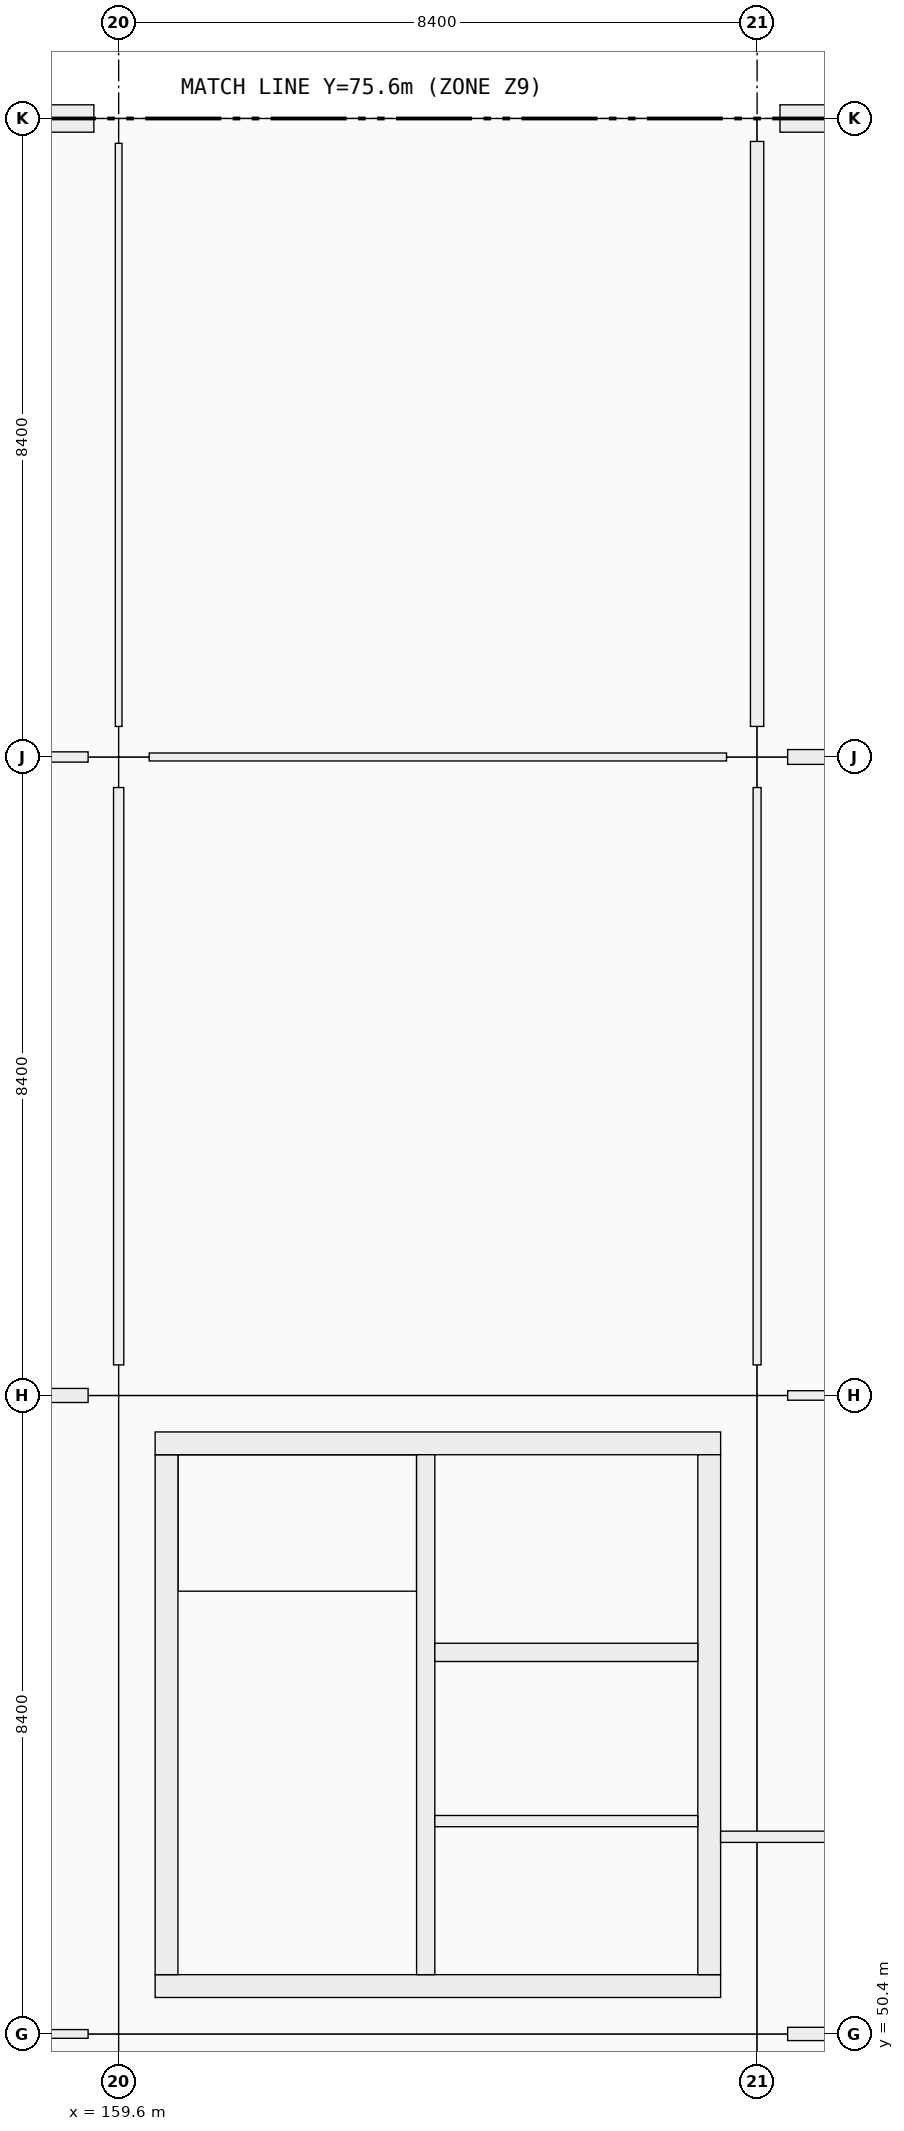
"""IFC4 building model, lengths in metres.
Left out: names, types, materials, properties, quantities, classifications, styles, units other than length and angle.
Written with IfcOpenShell. Run it as: python <this file> out.ifc"""

import sys

from ifc_helpers import new_model, si_unit, direction, frame, frame_2d, origin, origin_2d, place, context, subcontext, project, spatial, rectangle, extrude, element, fill, save


model = new_model("IFC4")
c1 = context("Model", 3, precision=1e-05, world=origin(), true_north=direction((0.0, 1.0)))
c2 = subcontext(c1, "Body", "Model", "MODEL_VIEW")
j1 = project(units=[si_unit("LENGTHUNIT", "METRE"), si_unit("PLANEANGLEUNIT", "RADIAN")], contexts=[c1])
p1 = place(None, origin())
s1 = spatial("IfcSite", under=j1, at=p1, CompositionType="ELEMENT")
p2 = place(p1, origin())
s2 = spatial("IfcBuilding", under=s1, at=p2, CompositionType="ELEMENT")
p3 = place(p2, origin())
s3 = spatial("IfcBuildingStorey", under=s2, at=p3, CompositionType="ELEMENT", Elevation=0.0)
for number, where, z_axis, x_axis in (
    (1, (159.6, 50.4, 0.0), (0.0, 0.0, 1.0), (1.0, 0.0, 0.0)),
    (2, (159.6, 58.8, 0.0), (0.0, 0.0, 1.0), (1.0, 0.0, 0.0)),
    (3, (159.6, 67.2, 0.0), (0.0, 0.0, 1.0), (1.0, 0.0, 0.0)),
):
    element("IfcColumn", number, at=place(p3, frame(where, z_axis=z_axis, x_axis=x_axis)), inside=s3, PredefinedType="COLUMN", context=c2, shape_type="SweptSolid", body=[
        extrude(rectangle(XDim=0.8, YDim=0.8, at=origin_2d()), origin(), (0.0, 0.0, 1.0), 5.76),
    ])
p4 = place(p3, frame((159.6, 75.6, 0.0), z_axis=(0.0, 0.0, 1.0), x_axis=(1.0, 0.0, 0.0)))
e4 = element("IfcColumn", 4, at=p4, inside=s3, PredefinedType="COLUMN", context=c2, shape_type="SweptSolid", body=[
    extrude(rectangle(XDim=0.65, YDim=0.65, at=origin_2d()), origin(), (0.0, 0.0, 1.0), 5.76),
])
for number, where, z_axis, x_axis in (
    (5, (168.0, 50.4, 0.0), (0.0, 0.0, 1.0), (1.0, 0.0, 0.0)),
    (6, (168.0, 58.8, 0.0), (0.0, 0.0, 1.0), (1.0, 0.0, 0.0)),
    (7, (168.0, 67.2, 0.0), (0.0, 0.0, 1.0), (1.0, 0.0, 0.0)),
):
    element("IfcColumn", number, at=place(p3, frame(where, z_axis=z_axis, x_axis=x_axis)), inside=s3, PredefinedType="COLUMN", context=c2, shape_type="SweptSolid", body=[
        extrude(rectangle(XDim=0.8, YDim=0.8, at=origin_2d()), origin(), (0.0, 0.0, 1.0), 5.76),
    ])
p5 = place(p3, frame((168.0, 75.6, 0.0), z_axis=(0.0, 0.0, 1.0), x_axis=(1.0, 0.0, 0.0)))
e8 = element("IfcColumn", 8, at=p5, inside=s3, PredefinedType="COLUMN", context=c2, shape_type="SweptSolid", body=[
    extrude(rectangle(XDim=0.6, YDim=0.6, at=origin_2d()), origin(), (0.0, 0.0, 1.0), 5.76),
])
p6 = place(p3, frame((151.501, 75.6, 0.0), z_axis=(0.0, 0.0, 1.0), x_axis=(1.0, 0.0, 0.0)))
e9 = element("IfcWall", 9, at=p6, inside=s3, PredefinedType="SOLIDWALL", context=c2, shape_type="SweptSolid", body=[
    extrude(rectangle(XDim=7.773, YDim=0.36, at=frame_2d((3.886, 0.0))), origin(), (0.0, 0.0, 1.0), 4.7),
])
p7 = place(p6, frame((2.686, 0.0, 0.9)))
e10 = element("IfcOpeningElement", 10, at=p7, cuts=e9, PredefinedType="OPENING", context=c2, shape_type="SweptSolid", body=[
    extrude(rectangle(XDim=2.4, YDim=1.8, at=frame_2d((1.2, 0.9))), frame((0.0, 0.18, 0.0), z_axis=(0.0, -1.0, 0.0), x_axis=(1.0, 0.0, 0.0)), (0.0, 0.0, 1.0), 0.36),
])
p8 = place(p3, frame((168.301, 75.6, 0.0), z_axis=(0.0, 0.0, 1.0), x_axis=(1.0, 0.0, 0.0)))
e11 = element("IfcWall", 11, at=p8, inside=s3, PredefinedType="SOLIDWALL", context=c2, shape_type="SweptSolid", body=[
    extrude(rectangle(XDim=7.773, YDim=0.36, at=frame_2d((3.886, 0.0))), origin(), (0.0, 0.0, 1.0), 4.7),
])
p9 = place(p8, frame((2.386, 0.0, 0.9)))
e12 = element("IfcOpeningElement", 12, at=p9, cuts=e11, PredefinedType="OPENING", context=c2, shape_type="SweptSolid", body=[
    extrude(rectangle(XDim=3.0, YDim=1.2, at=frame_2d((1.5, 0.6))), frame((0.0, 0.18, 0.0), z_axis=(0.0, -1.0, 0.0), x_axis=(1.0, 0.0, 0.0)), (0.0, 0.0, 1.0), 0.36),
])
p10 = place(p3, frame((167.52, 51.03, 0.0), z_axis=(0.0, 0.0, 1.0), x_axis=(-1.0, 0.0, 0.0)))
e13 = element("IfcWall", 13, at=p10, inside=s3, PredefinedType="SHEAR", context=c2, shape_type="SweptSolid", body=[
    extrude(rectangle(XDim=7.44, YDim=0.3, at=frame_2d((3.72, 0.0))), origin(), (0.0, 0.0, 1.0), 5.76),
])
p11 = place(p10, frame((1.28, 0.0, 0.0)))
e14 = element("IfcOpeningElement", 14, at=p11, cuts=e13, PredefinedType="OPENING", context=c2, shape_type="SweptSolid", body=[
    extrude(rectangle(XDim=1.5, YDim=2.15, at=frame_2d((0.75, 1.075))), frame((0.0, 0.15, 0.0), z_axis=(0.0, -1.0, 0.0), x_axis=(1.0, 0.0, 0.0)), (0.0, 0.0, 1.0), 0.3),
])
p12 = place(p3, frame((160.23, 51.18, 0.0), z_axis=(0.0, 0.0, 1.0), x_axis=(0.0, 1.0, 0.0)))
e15 = element("IfcWall", 15, at=p12, inside=s3, PredefinedType="SHEAR", context=c2, shape_type="SweptSolid", body=[
    extrude(rectangle(XDim=6.84, YDim=0.3, at=frame_2d((3.42, 0.0))), origin(), (0.0, 0.0, 1.0), 5.76),
])
p13 = place(p3, frame((160.08, 58.17, 0.0), z_axis=(0.0, 0.0, 1.0), x_axis=(1.0, 0.0, 0.0)))
e16 = element("IfcWall", 16, at=p13, inside=s3, PredefinedType="SHEAR", context=c2, shape_type="SweptSolid", body=[
    extrude(rectangle(XDim=7.44, YDim=0.3, at=frame_2d((3.72, 0.0))), origin(), (0.0, 0.0, 1.0), 5.76),
])
p14 = place(p3, frame((167.37, 58.02, 0.0), z_axis=(0.0, 0.0, 1.0), x_axis=(0.0, -1.0, 0.0)))
e17 = element("IfcWall", 17, at=p14, inside=s3, PredefinedType="SHEAR", context=c2, shape_type="SweptSolid", body=[
    extrude(rectangle(XDim=6.84, YDim=0.3, at=frame_2d((3.42, 0.0))), origin(), (0.0, 0.0, 1.0), 5.76),
])
p15 = place(p14, frame((5.12, 0.0, 0.0)))
e18 = element("IfcOpeningElement", 18, at=p15, cuts=e17, PredefinedType="OPENING", context=c2, shape_type="SweptSolid", body=[
    extrude(rectangle(XDim=1.5, YDim=2.15, at=frame_2d((0.75, 1.075))), frame((0.0, 0.15, 0.0), z_axis=(0.0, -1.0, 0.0), x_axis=(1.0, 0.0, 0.0)), (0.0, 0.0, 1.0), 0.3),
])
p16 = place(p3, frame((163.64, 51.18, 0.0), z_axis=(0.0, 0.0, 1.0), x_axis=(0.0, 1.0, 0.0)))
e19 = element("IfcWall", 19, at=p16, inside=s3, PredefinedType="SHEAR", context=c2, shape_type="SweptSolid", body=[
    extrude(rectangle(XDim=6.84, YDim=0.24, at=frame_2d((3.42, 0.0))), origin(), (0.0, 0.0, 1.0), 5.76),
])
p17 = place(p16, frame((0.12, 0.0, 0.0)))
e20 = element("IfcOpeningElement", 20, at=p17, cuts=e19, PredefinedType="OPENING", context=c2, shape_type="SweptSolid", body=[
    extrude(rectangle(XDim=1.0, YDim=2.15, at=frame_2d((0.5, 1.075))), frame((0.0, 0.12, 0.0), z_axis=(0.0, -1.0, 0.0), x_axis=(1.0, 0.0, 0.0)), (0.0, 0.0, 1.0), 0.24),
])
p18 = place(p3, frame((163.76, 55.42, 0.0), z_axis=(0.0, 0.0, 1.0), x_axis=(1.0, 0.0, 0.0)))
e21 = element("IfcWall", 21, at=p18, inside=s3, PredefinedType="SHEAR", context=c2, shape_type="SweptSolid", body=[
    extrude(rectangle(XDim=3.46, YDim=0.24, at=frame_2d((1.73, 0.0))), origin(), (0.0, 0.0, 1.0), 5.76),
])
p19 = place(p18, frame((1.08, 0.0, 0.0)))
e22 = element("IfcOpeningElement", 22, at=p19, cuts=e21, PredefinedType="OPENING", context=c2, shape_type="SweptSolid", body=[
    extrude(rectangle(XDim=1.3, YDim=2.25, at=frame_2d((0.65, 1.125))), frame((0.0, 0.12, 0.0), z_axis=(0.0, -1.0, 0.0), x_axis=(1.0, 0.0, 0.0)), (0.0, 0.0, 1.0), 0.24),
])
p20 = place(p3, frame((167.22, 53.2, 0.0), z_axis=(0.0, 0.0, 1.0), x_axis=(-1.0, 0.0, 0.0)))
e23 = element("IfcWall", 23, at=p20, inside=s3, PredefinedType="PARTITIONING", context=c2, shape_type="SweptSolid", body=[
    extrude(rectangle(XDim=3.46, YDim=0.148, at=frame_2d((1.73, 0.0))), origin(), (0.0, 0.0, 1.0), 5.51),
])
p21 = place(p20, frame((0.98, 0.0, 0.0)))
e24 = element("IfcOpeningElement", 24, at=p21, cuts=e23, PredefinedType="OPENING", context=c2, shape_type="SweptSolid", body=[
    extrude(rectangle(XDim=1.5, YDim=2.15, at=frame_2d((0.75, 1.075))), frame((0.0, 0.074, 0.0), z_axis=(0.0, -1.0, 0.0), x_axis=(1.0, 0.0, 0.0)), (0.0, 0.0, 1.0), 0.148),
])
p22 = place(p3, frame((151.602, 50.4, 0.0), z_axis=(0.0, 0.0, 1.0), x_axis=(1.0, 0.0, 0.0)))
e25 = element("IfcWall", 25, at=p22, inside=s3, PredefinedType="PARTITIONING", context=c2, shape_type="SweptSolid", body=[
    extrude(rectangle(XDim=7.596, YDim=0.115, at=frame_2d((3.798, 0.0))), origin(), (0.0, 0.0, 1.0), 3.66),
])
p23 = place(p22, frame((3.308, 0.0, 0.0)))
e26 = element("IfcOpeningElement", 26, at=p23, cuts=e25, PredefinedType="OPENING", context=c2, shape_type="SweptSolid", body=[
    extrude(rectangle(XDim=0.98, YDim=2.18, at=frame_2d((0.49, 1.09))), frame((0.0, 0.058, 0.0), z_axis=(0.0, -1.0, 0.0), x_axis=(1.0, 0.0, 0.0)), (0.0, 0.0, 1.0), 0.115),
])
p24 = place(p3, frame((151.602, 58.8, 0.0), z_axis=(0.0, 0.0, 1.0), x_axis=(1.0, 0.0, 0.0)))
e27 = element("IfcWall", 27, at=p24, inside=s3, PredefinedType="PARTITIONING", context=c2, shape_type="SweptSolid", body=[
    extrude(rectangle(XDim=7.596, YDim=0.185, at=frame_2d((3.798, 0.0))), origin(), (0.0, 0.0, 1.0), 3.66),
])
p25 = place(p24, frame((3.318, 0.0, 0.0)))
e28 = element("IfcOpeningElement", 28, at=p25, cuts=e27, PredefinedType="OPENING", context=c2, shape_type="SweptSolid", body=[
    extrude(rectangle(XDim=0.96, YDim=2.18, at=frame_2d((0.48, 1.09))), frame((0.0, 0.093, 0.0), z_axis=(0.0, -1.0, 0.0), x_axis=(1.0, 0.0, 0.0)), (0.0, 0.0, 1.0), 0.185),
])
p26 = place(p3, frame((151.602, 67.2, 0.0), z_axis=(0.0, 0.0, 1.0), x_axis=(1.0, 0.0, 0.0)))
e29 = element("IfcWall", 29, at=p26, inside=s3, PredefinedType="PARTITIONING", context=c2, shape_type="SweptSolid", body=[
    extrude(rectangle(XDim=7.596, YDim=0.135, at=frame_2d((3.798, 0.0))), origin(), (0.0, 0.0, 1.0), 3.66),
])
p27 = place(p26, frame((3.328, 0.0, 0.0)))
e30 = element("IfcOpeningElement", 30, at=p27, cuts=e29, PredefinedType="OPENING", context=c2, shape_type="SweptSolid", body=[
    extrude(rectangle(XDim=0.94, YDim=2.15, at=frame_2d((0.47, 1.075))), frame((0.0, 0.067, 0.0), z_axis=(0.0, -1.0, 0.0), x_axis=(1.0, 0.0, 0.0)), (0.0, 0.0, 1.0), 0.135),
])
p28 = place(p3, frame((160.002, 67.2, 0.0), z_axis=(0.0, 0.0, 1.0), x_axis=(1.0, 0.0, 0.0)))
e31 = element("IfcWall", 31, at=p28, inside=s3, PredefinedType="PARTITIONING", context=c2, shape_type="SweptSolid", body=[
    extrude(rectangle(XDim=7.596, YDim=0.105, at=frame_2d((3.798, 0.0))), origin(), (0.0, 0.0, 1.0), 3.66),
])
p29 = place(p28, frame((3.273, 0.0, 0.0)))
e32 = element("IfcOpeningElement", 32, at=p29, cuts=e31, PredefinedType="OPENING", context=c2, shape_type="SweptSolid", body=[
    extrude(rectangle(XDim=1.05, YDim=2.12, at=frame_2d((0.525, 1.06))), frame((0.0, 0.052, 0.0), z_axis=(0.0, -1.0, 0.0), x_axis=(1.0, 0.0, 0.0)), (0.0, 0.0, 1.0), 0.105),
])
p30 = place(p3, frame((168.402, 50.4, 0.0), z_axis=(0.0, 0.0, 1.0), x_axis=(1.0, 0.0, 0.0)))
e33 = element("IfcWall", 33, at=p30, inside=s3, PredefinedType="PARTITIONING", context=c2, shape_type="SweptSolid", body=[
    extrude(rectangle(XDim=7.696, YDim=0.175, at=frame_2d((3.848, 0.0))), origin(), (0.0, 0.0, 1.0), 3.66),
])
p31 = place(p30, frame((3.308, 0.0, 0.0)))
e34 = element("IfcOpeningElement", 34, at=p31, cuts=e33, PredefinedType="OPENING", context=c2, shape_type="SweptSolid", body=[
    extrude(rectangle(XDim=1.08, YDim=2.25, at=frame_2d((0.54, 1.125))), frame((0.0, 0.087, 0.0), z_axis=(0.0, -1.0, 0.0), x_axis=(1.0, 0.0, 0.0)), (0.0, 0.0, 1.0), 0.175),
])
p32 = place(p3, frame((168.402, 58.8, 0.0), z_axis=(0.0, 0.0, 1.0), x_axis=(1.0, 0.0, 0.0)))
e35 = element("IfcWall", 35, at=p32, inside=s3, PredefinedType="PARTITIONING", context=c2, shape_type="SweptSolid", body=[
    extrude(rectangle(XDim=7.671, YDim=0.125, at=frame_2d((3.835, 0.0))), origin(), (0.0, 0.0, 1.0), 3.66),
])
p33 = place(p32, frame((3.306, 0.0, 0.0)))
e36 = element("IfcOpeningElement", 36, at=p33, cuts=e35, PredefinedType="OPENING", context=c2, shape_type="SweptSolid", body=[
    extrude(rectangle(XDim=1.06, YDim=2.25, at=frame_2d((0.53, 1.125))), frame((0.0, 0.062, 0.0), z_axis=(0.0, -1.0, 0.0), x_axis=(1.0, 0.0, 0.0)), (0.0, 0.0, 1.0), 0.125),
])
p34 = place(p3, frame((168.402, 67.2, 0.0), z_axis=(0.0, 0.0, 1.0), x_axis=(1.0, 0.0, 0.0)))
e37 = element("IfcWall", 37, at=p34, inside=s3, PredefinedType="PARTITIONING", context=c2, shape_type="SweptSolid", body=[
    extrude(rectangle(XDim=7.696, YDim=0.195, at=frame_2d((3.848, 0.0))), origin(), (0.0, 0.0, 1.0), 3.66),
])
p35 = place(p34, frame((3.328, 0.0, 0.0)))
e38 = element("IfcOpeningElement", 38, at=p35, cuts=e37, PredefinedType="OPENING", context=c2, shape_type="SweptSolid", body=[
    extrude(rectangle(XDim=1.04, YDim=2.2, at=frame_2d((0.52, 1.1))), frame((0.0, 0.098, 0.0), z_axis=(0.0, -1.0, 0.0), x_axis=(1.0, 0.0, 0.0)), (0.0, 0.0, 1.0), 0.195),
])
p36 = place(p3, frame((159.6, 59.202, 0.0), z_axis=(0.0, 0.0, 1.0), x_axis=(0.0, 1.0, 0.0)))
e39 = element("IfcWall", 39, at=p36, inside=s3, PredefinedType="PARTITIONING", context=c2, shape_type="SweptSolid", body=[
    extrude(rectangle(XDim=7.596, YDim=0.135, at=frame_2d((3.798, 0.0))), origin(), (0.0, 0.0, 1.0), 3.66),
])
p37 = place(p36, frame((3.288, 0.0, 0.0)))
e40 = element("IfcOpeningElement", 40, at=p37, cuts=e39, PredefinedType="OPENING", context=c2, shape_type="SweptSolid", body=[
    extrude(rectangle(XDim=1.02, YDim=2.2, at=frame_2d((0.51, 1.1))), frame((0.0, 0.067, 0.0), z_axis=(0.0, -1.0, 0.0), x_axis=(1.0, 0.0, 0.0)), (0.0, 0.0, 1.0), 0.135),
])
p38 = place(p3, frame((159.6, 67.602, 0.0), z_axis=(0.0, 0.0, 1.0), x_axis=(0.0, 1.0, 0.0)))
e41 = element("IfcWall", 41, at=p38, inside=s3, PredefinedType="PARTITIONING", context=c2, shape_type="SweptSolid", body=[
    extrude(rectangle(XDim=7.671, YDim=0.088, at=frame_2d((3.835, 0.0))), origin(), (0.0, 0.0, 1.0), 3.66),
])
p39 = place(p38, frame((3.331, 0.0, 0.0)))
e42 = element("IfcOpeningElement", 42, at=p39, cuts=e41, PredefinedType="OPENING", context=c2, shape_type="SweptSolid", body=[
    extrude(rectangle(XDim=1.01, YDim=2.12, at=frame_2d((0.505, 1.06))), frame((0.0, 0.044, 0.0), z_axis=(0.0, -1.0, 0.0), x_axis=(1.0, 0.0, 0.0)), (0.0, 0.0, 1.0), 0.088),
])
p40 = place(p3, frame((168.0, 59.202, 0.0), z_axis=(0.0, 0.0, 1.0), x_axis=(0.0, 1.0, 0.0)))
e43 = element("IfcWall", 43, at=p40, inside=s3, PredefinedType="PARTITIONING", context=c2, shape_type="SweptSolid", body=[
    extrude(rectangle(XDim=7.596, YDim=0.105, at=frame_2d((3.798, 0.0))), origin(), (0.0, 0.0, 1.0), 3.66),
])
p41 = place(p40, frame((3.258, 0.0, 0.0)))
e44 = element("IfcOpeningElement", 44, at=p41, cuts=e43, PredefinedType="OPENING", context=c2, shape_type="SweptSolid", body=[
    extrude(rectangle(XDim=1.08, YDim=2.25, at=frame_2d((0.54, 1.125))), frame((0.0, 0.052, 0.0), z_axis=(0.0, -1.0, 0.0), x_axis=(1.0, 0.0, 0.0)), (0.0, 0.0, 1.0), 0.105),
])
p42 = place(p3, frame((168.0, 67.602, 0.0), z_axis=(0.0, 0.0, 1.0), x_axis=(0.0, 1.0, 0.0)))
e45 = element("IfcWall", 45, at=p42, inside=s3, PredefinedType="PARTITIONING", context=c2, shape_type="SweptSolid", body=[
    extrude(rectangle(XDim=7.696, YDim=0.175, at=frame_2d((3.848, 0.0))), origin(), (0.0, 0.0, 1.0), 3.66),
])
p43 = place(p42, frame((3.318, 0.0, 0.0)))
e46 = element("IfcOpeningElement", 46, at=p43, cuts=e45, PredefinedType="OPENING", context=c2, shape_type="SweptSolid", body=[
    extrude(rectangle(XDim=1.06, YDim=2.25, at=frame_2d((0.53, 1.125))), frame((0.0, 0.087, 0.0), z_axis=(0.0, -1.0, 0.0), x_axis=(1.0, 0.0, 0.0)), (0.0, 0.0, 1.0), 0.175),
])
p44 = place(p3, frame((167.52, 52.994, 0.0), z_axis=(0.0, 0.0, 1.0), x_axis=(1.0, 0.0, 0.0)))
e47 = element("IfcWall", 47, at=p44, inside=s3, PredefinedType="PARTITIONING", context=c2, shape_type="SweptSolid", body=[
    extrude(rectangle(XDim=8.7, YDim=0.148, at=frame_2d((4.35, 0.0))), origin(), (0.0, 0.0, 1.0), 3.66),
])
p45 = place(p17, origin())
e48 = element("IfcDoor", 48, at=p45, inside=s3, OperationType="SINGLE_SWING_LEFT", PredefinedType="DOOR", context=c2, shape_type="SweptSolid", body=[
    extrude(rectangle(XDim=1.0, YDim=2.15, at=frame_2d((0.5, 1.075))), frame((0.0, 0.025, 0.0), z_axis=(0.0, -1.0, 0.0), x_axis=(1.0, 0.0, 0.0)), (0.0, 0.0, 1.0), 0.05),
])
fill(e20, e48)
p46 = place(p11, origin())
e49 = element("IfcDoor", 49, at=p46, inside=s3, OperationType="DOUBLE_DOOR_SINGLE_SWING", PredefinedType="DOOR", context=c2, shape_type="SweptSolid", body=[
    extrude(rectangle(XDim=1.5, YDim=2.15, at=frame_2d((0.75, 1.075))), frame((0.0, 0.025, 0.0), z_axis=(0.0, -1.0, 0.0), x_axis=(1.0, 0.0, 0.0)), (0.0, 0.0, 1.0), 0.05),
])
fill(e14, e49)
p47 = place(p15, origin())
e50 = element("IfcDoor", 50, at=p47, inside=s3, OperationType="DOUBLE_DOOR_SINGLE_SWING", PredefinedType="DOOR", context=c2, shape_type="SweptSolid", body=[
    extrude(rectangle(XDim=1.5, YDim=2.15, at=frame_2d((0.75, 1.075))), frame((0.0, 0.025, 0.0), z_axis=(0.0, -1.0, 0.0), x_axis=(1.0, 0.0, 0.0)), (0.0, 0.0, 1.0), 0.05),
])
fill(e18, e50)
p48 = place(p19, origin())
e51 = element("IfcDoor", 51, at=p48, inside=s3, OperationType="DOUBLE_DOOR_SLIDING", PredefinedType="DOOR", context=c2, shape_type="SweptSolid", body=[
    extrude(rectangle(XDim=1.3, YDim=2.25, at=frame_2d((0.65, 1.125))), frame((0.0, 0.025, 0.0), z_axis=(0.0, -1.0, 0.0), x_axis=(1.0, 0.0, 0.0)), (0.0, 0.0, 1.0), 0.05),
])
fill(e22, e51)
p49 = place(p21, origin())
e52 = element("IfcDoor", 52, at=p49, inside=s3, OperationType="DOUBLE_DOOR_SINGLE_SWING", PredefinedType="DOOR", context=c2, shape_type="SweptSolid", body=[
    extrude(rectangle(XDim=1.5, YDim=2.15, at=frame_2d((0.75, 1.075))), frame((0.0, 0.025, 0.0), z_axis=(0.0, -1.0, 0.0), x_axis=(1.0, 0.0, 0.0)), (0.0, 0.0, 1.0), 0.05),
])
fill(e24, e52)
p50 = place(p29, origin())
e53 = element("IfcDoor", 53, at=p50, inside=s3, OperationType="SINGLE_SWING_RIGHT", PredefinedType="DOOR", context=c2, shape_type="SweptSolid", body=[
    extrude(rectangle(XDim=1.05, YDim=2.12, at=frame_2d((0.525, 1.06))), frame((0.0, 0.025, 0.0), z_axis=(0.0, -1.0, 0.0), x_axis=(1.0, 0.0, 0.0)), (0.0, 0.0, 1.0), 0.05),
])
fill(e32, e53)
p51 = place(p37, origin())
e54 = element("IfcDoor", 54, at=p51, inside=s3, OperationType="SINGLE_SWING_LEFT", PredefinedType="DOOR", context=c2, shape_type="SweptSolid", body=[
    extrude(rectangle(XDim=1.02, YDim=2.2, at=frame_2d((0.51, 1.1))), frame((0.0, 0.025, 0.0), z_axis=(0.0, -1.0, 0.0), x_axis=(1.0, 0.0, 0.0)), (0.0, 0.0, 1.0), 0.05),
])
fill(e40, e54)
p52 = place(p39, origin())
e55 = element("IfcDoor", 55, at=p52, inside=s3, OperationType="SINGLE_SWING_RIGHT", PredefinedType="DOOR", context=c2, shape_type="SweptSolid", body=[
    extrude(rectangle(XDim=1.01, YDim=2.12, at=frame_2d((0.505, 1.06))), frame((0.0, 0.025, 0.0), z_axis=(0.0, -1.0, 0.0), x_axis=(1.0, 0.0, 0.0)), (0.0, 0.0, 1.0), 0.05),
])
fill(e42, e55)
p53 = place(p41, origin())
e56 = element("IfcDoor", 56, at=p53, inside=s3, OperationType="SINGLE_SWING_LEFT", PredefinedType="DOOR", context=c2, shape_type="SweptSolid", body=[
    extrude(rectangle(XDim=1.08, YDim=2.25, at=frame_2d((0.54, 1.125))), frame((0.0, 0.025, 0.0), z_axis=(0.0, -1.0, 0.0), x_axis=(1.0, 0.0, 0.0)), (0.0, 0.0, 1.0), 0.05),
])
fill(e44, e56)
p54 = place(p43, origin())
e57 = element("IfcDoor", 57, at=p54, inside=s3, OperationType="SINGLE_SWING_RIGHT", PredefinedType="DOOR", context=c2, shape_type="SweptSolid", body=[
    extrude(rectangle(XDim=1.06, YDim=2.25, at=frame_2d((0.53, 1.125))), frame((0.0, 0.025, 0.0), z_axis=(0.0, -1.0, 0.0), x_axis=(1.0, 0.0, 0.0)), (0.0, 0.0, 1.0), 0.05),
])
fill(e46, e57)
save(model, sys.argv[1])
